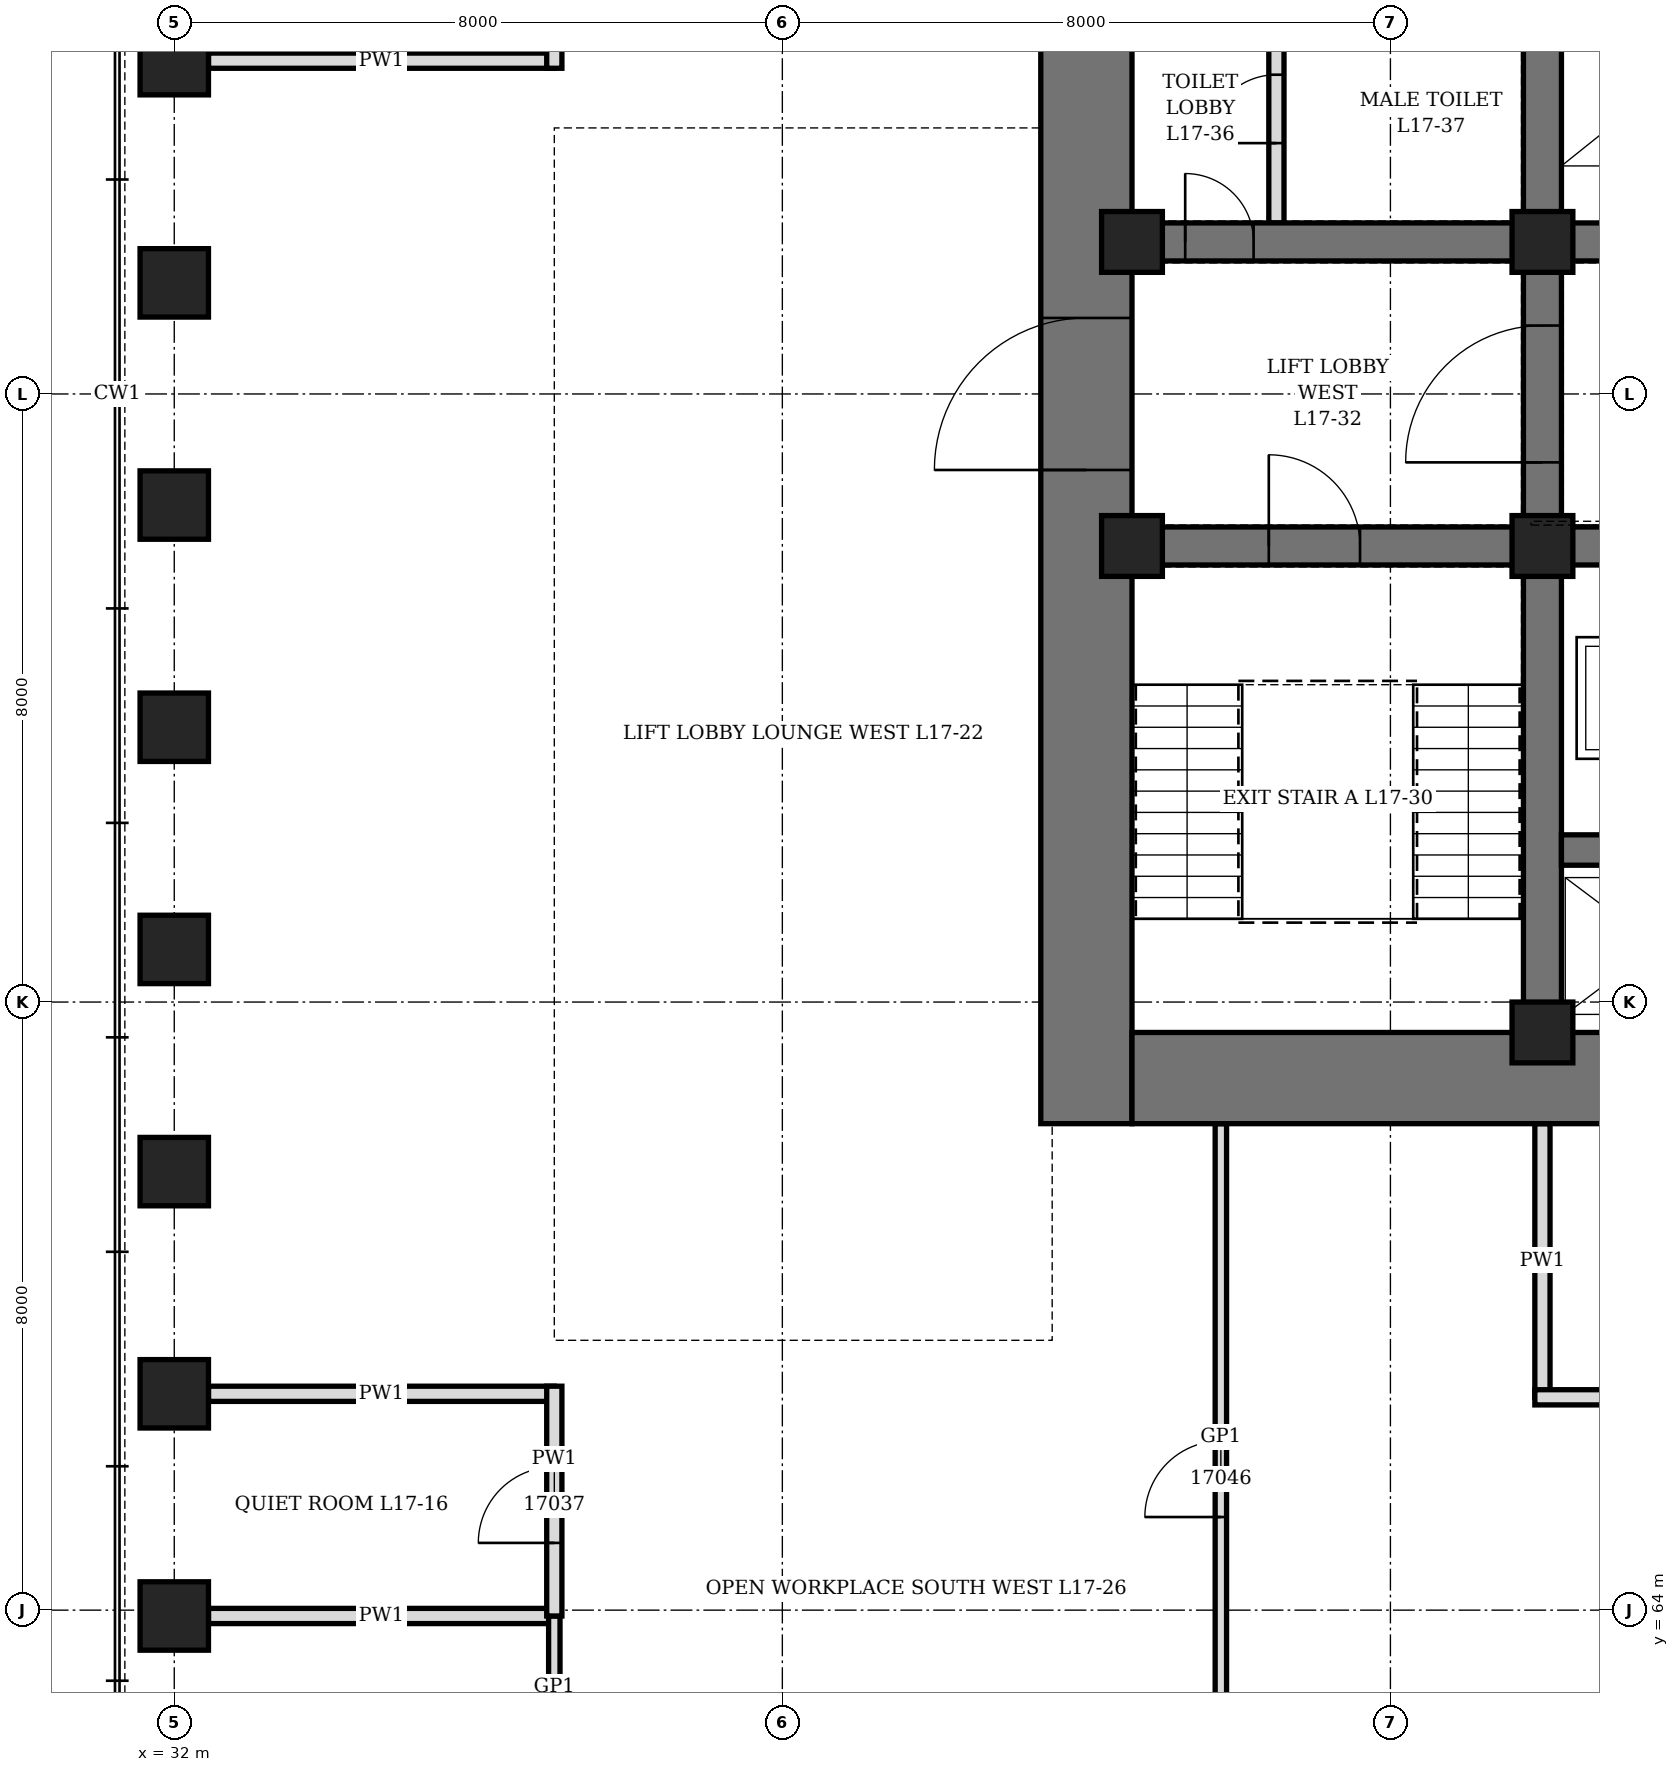
"""IFC4 building model, lengths in metres.
Left out: names, types, materials, properties, quantities, classifications, styles, units other than length and angle.
Written with IfcOpenShell. Run it as: python <this file> out.ifc"""

import sys

from ifc_helpers import new_model, si_unit, direction, frame, frame_2d, origin, origin_2d, place, context, subcontext, project, spatial, rectangle, hollow_rectangle, extrude, element, fill, save


model = new_model("IFC4")
c1 = context("Model", 3, precision=1e-05, world=origin(), true_north=direction((0.0, 1.0)))
c2 = subcontext(c1, "Body", "Model", "MODEL_VIEW")
j1 = project(units=[si_unit("LENGTHUNIT", "METRE"), si_unit("PLANEANGLEUNIT", "RADIAN")], contexts=[c1])
p1 = place(None, origin())
s1 = spatial("IfcSite", under=j1, at=p1, CompositionType="ELEMENT")
p2 = place(p1, origin())
s2 = spatial("IfcBuilding", under=s1, at=p2, CompositionType="ELEMENT")
p3 = place(p2, frame((0.0, 0.0, 81.1)))
s3 = spatial("IfcBuildingStorey", under=s2, at=p3, CompositionType="ELEMENT", Elevation=81.1)
for number, where, z_axis, x_axis in (
    (1, (32.0, 84.385, 0.0), (0.0, 0.0, 1.0), (0.0, 1.0, 0.0)),
    (2, (32.0, 81.461, 0.0), (0.0, 0.0, 1.0), (0.0, 1.0, 0.0)),
    (3, (32.0, 78.539, 0.0), (0.0, 0.0, 1.0), (0.0, 1.0, 0.0)),
    (4, (32.0, 75.615, 0.0), (0.0, 0.0, 1.0), (0.0, 1.0, 0.0)),
    (5, (32.0, 72.692, 0.0), (0.0, 0.0, 1.0), (0.0, 1.0, 0.0)),
    (6, (32.0, 69.769, 0.0), (0.0, 0.0, 1.0), (0.0, 1.0, 0.0)),
    (7, (32.0, 66.846, 0.0), (0.0, 0.0, 1.0), (0.0, 1.0, 0.0)),
    (8, (32.0, 63.923, 0.0), (0.0, 0.0, 1.0), (0.0, 1.0, 0.0)),
):
    element("IfcColumn", number, at=place(p3, frame(where, z_axis=z_axis, x_axis=x_axis)), inside=s3, PredefinedType="COLUMN", context=c2, shape_type="SweptSolid", body=[
        extrude(hollow_rectangle(XDim=0.9, YDim=0.9, WallThickness=0.12, at=origin_2d()), origin(), (0.0, 0.0, 1.0), 4.2),
    ])
p4 = place(p3, frame((44.0, 70.4, 0.0), z_axis=(0.0, 0.0, 1.0), x_axis=(0.0, 1.0, 0.0)))
e9 = element("IfcWall", 9, at=p4, inside=s3, PredefinedType="SHEAR", context=c2, shape_type="SweptSolid", body=[
    extrude(rectangle(XDim=19.2, YDim=1.2, at=frame_2d((9.6, 0.0))), origin(), (0.0, 0.0, 1.0), 4.2),
])
p5 = place(p4, frame((8.6, 0.0, 0.0)))
e10 = element("IfcOpeningElement", 10, at=p5, cuts=e9, PredefinedType="OPENING", context=c2, shape_type="SweptSolid", body=[
    extrude(rectangle(XDim=2.0, YDim=2.4, at=frame_2d((1.0, 1.2))), frame((0.0, 0.61, 0.0), z_axis=(0.0, -1.0, 0.0), x_axis=(1.0, 0.0, 0.0)), (0.0, 0.0, 1.0), 1.22),
])
p6 = place(p3, frame((44.6, 71.0, 0.0), z_axis=(0.0, 0.0, 1.0), x_axis=(1.0, 0.0, 0.0)))
e11 = element("IfcWall", 11, at=p6, inside=s3, PredefinedType="SHEAR", context=c2, shape_type="SweptSolid", body=[
    extrude(rectangle(XDim=22.8, YDim=1.2, at=frame_2d((11.4, 0.0))), origin(), (0.0, 0.0, 1.0), 4.2),
])
p7 = place(p3, frame((50.0, 71.6, 0.0), z_axis=(0.0, 0.0, 1.0), x_axis=(0.0, 1.0, 0.0)))
e12 = element("IfcWall", 12, at=p7, inside=s3, PredefinedType="SHEAR", context=c2, shape_type="SweptSolid", body=[
    extrude(rectangle(XDim=16.8, YDim=0.5, at=frame_2d((8.4, 0.0))), origin(), (0.0, 0.0, 1.0), 4.2),
])
p8 = place(p7, frame((7.5, 0.0, 0.0)))
e13 = element("IfcOpeningElement", 13, at=p8, cuts=e12, PredefinedType="OPENING", context=c2, shape_type="SweptSolid", body=[
    extrude(rectangle(XDim=1.8, YDim=2.4, at=frame_2d((0.9, 1.2))), frame((0.0, 0.26, 0.0), z_axis=(0.0, -1.0, 0.0), x_axis=(1.0, 0.0, 0.0)), (0.0, 0.0, 1.0), 0.52),
])
p9 = place(p3, frame((44.6, 78.0, 0.0), z_axis=(0.0, 0.0, 1.0), x_axis=(1.0, 0.0, 0.0)))
e14 = element("IfcWall", 14, at=p9, inside=s3, PredefinedType="SHEAR", context=c2, shape_type="SweptSolid", body=[
    extrude(rectangle(XDim=5.15, YDim=0.5, at=frame_2d((2.575, 0.0))), origin(), (0.0, 0.0, 1.0), 4.2),
])
p10 = place(p9, frame((1.8, 0.0, 0.0)))
e15 = element("IfcOpeningElement", 15, at=p10, cuts=e14, PredefinedType="OPENING", context=c2, shape_type="SweptSolid", body=[
    extrude(rectangle(XDim=1.2, YDim=2.1, at=frame_2d((0.6, 1.05))), frame((0.0, 0.26, 0.0), z_axis=(0.0, -1.0, 0.0), x_axis=(1.0, 0.0, 0.0)), (0.0, 0.0, 1.0), 0.52),
])
p11 = place(p3, frame((44.6, 82.0, 0.0), z_axis=(0.0, 0.0, 1.0), x_axis=(1.0, 0.0, 0.0)))
e16 = element("IfcWall", 16, at=p11, inside=s3, PredefinedType="SHEAR", context=c2, shape_type="SweptSolid", body=[
    extrude(rectangle(XDim=5.15, YDim=0.5, at=frame_2d((2.575, 0.0))), origin(), (0.0, 0.0, 1.0), 4.2),
])
p12 = place(p11, frame((0.7, 0.0, 0.0)))
e17 = element("IfcOpeningElement", 17, at=p12, cuts=e16, PredefinedType="OPENING", context=c2, shape_type="SweptSolid", body=[
    extrude(rectangle(XDim=0.9, YDim=2.1, at=frame_2d((0.45, 1.05))), frame((0.0, 0.26, 0.0), z_axis=(0.0, -1.0, 0.0), x_axis=(1.0, 0.0, 0.0)), (0.0, 0.0, 1.0), 0.52),
])
p13 = place(p3, frame((50.25, 78.0, 0.0), z_axis=(0.0, 0.0, 1.0), x_axis=(1.0, 0.0, 0.0)))
e18 = element("IfcWall", 18, at=p13, inside=s3, PredefinedType="SHEAR", context=c2, shape_type="SweptSolid", body=[
    extrude(rectangle(XDim=11.5, YDim=0.5, at=frame_2d((5.75, 0.0))), origin(), (0.0, 0.0, 1.0), 4.2),
])
p14 = place(p13, frame((0.7, 0.0, 0.0)))
e19 = element("IfcOpeningElement", 19, at=p14, cuts=e18, PredefinedType="OPENING", context=c2, shape_type="SweptSolid", body=[
    extrude(rectangle(XDim=1.1, YDim=2.2, at=frame_2d((0.55, 1.1))), frame((0.0, 0.26, 0.0), z_axis=(0.0, -1.0, 0.0), x_axis=(1.0, 0.0, 0.0)), (0.0, 0.0, 1.0), 0.52),
])
p15 = place(p13, frame((3.7, 0.0, 0.0)))
e20 = element("IfcOpeningElement", 20, at=p15, cuts=e18, PredefinedType="OPENING", context=c2, shape_type="SweptSolid", body=[
    extrude(rectangle(XDim=1.1, YDim=2.2, at=frame_2d((0.55, 1.1))), frame((0.0, 0.26, 0.0), z_axis=(0.0, -1.0, 0.0), x_axis=(1.0, 0.0, 0.0)), (0.0, 0.0, 1.0), 0.52),
])
p16 = place(p13, frame((6.7, 0.0, 0.0)))
e21 = element("IfcOpeningElement", 21, at=p16, cuts=e18, PredefinedType="OPENING", context=c2, shape_type="SweptSolid", body=[
    extrude(rectangle(XDim=1.1, YDim=2.2, at=frame_2d((0.55, 1.1))), frame((0.0, 0.26, 0.0), z_axis=(0.0, -1.0, 0.0), x_axis=(1.0, 0.0, 0.0)), (0.0, 0.0, 1.0), 0.52),
])
p17 = place(p13, frame((9.7, 0.0, 0.0)))
e22 = element("IfcOpeningElement", 22, at=p17, cuts=e18, PredefinedType="OPENING", context=c2, shape_type="SweptSolid", body=[
    extrude(rectangle(XDim=1.1, YDim=2.2, at=frame_2d((0.55, 1.1))), frame((0.0, 0.26, 0.0), z_axis=(0.0, -1.0, 0.0), x_axis=(1.0, 0.0, 0.0)), (0.0, 0.0, 1.0), 0.52),
])
p18 = place(p3, frame((50.25, 82.0, 0.0), z_axis=(0.0, 0.0, 1.0), x_axis=(1.0, 0.0, 0.0)))
e23 = element("IfcWall", 23, at=p18, inside=s3, PredefinedType="SHEAR", context=c2, shape_type="SweptSolid", body=[
    extrude(rectangle(XDim=11.5, YDim=0.5, at=frame_2d((5.75, 0.0))), origin(), (0.0, 0.0, 1.0), 4.2),
])
p19 = place(p3, frame((50.25, 74.0, 0.0), z_axis=(0.0, 0.0, 1.0), x_axis=(1.0, 0.0, 0.0)))
e24 = element("IfcWall", 24, at=p19, inside=s3, PredefinedType="SHEAR", context=c2, shape_type="SweptSolid", body=[
    extrude(rectangle(XDim=11.5, YDim=0.4, at=frame_2d((5.75, 0.0))), origin(), (0.0, 0.0, 1.0), 4.2),
])
for number, where, z_axis, x_axis in (
    (25, (44.6, 78.0, 0.0), (0.0, 0.0, 1.0), (1.0, 0.0, 0.0)),
    (26, (44.6, 82.0, 0.0), (0.0, 0.0, 1.0), (1.0, 0.0, 0.0)),
    (27, (50.0, 71.6, 0.0), (0.0, 0.0, 1.0), (1.0, 0.0, 0.0)),
    (28, (50.0, 78.0, 0.0), (0.0, 0.0, 1.0), (1.0, 0.0, 0.0)),
    (29, (50.0, 82.0, 0.0), (0.0, 0.0, 1.0), (1.0, 0.0, 0.0)),
):
    element("IfcColumn", number, at=place(p3, frame(where, z_axis=z_axis, x_axis=x_axis)), inside=s3, PredefinedType="COLUMN", context=c2, shape_type="SweptSolid", body=[
        extrude(hollow_rectangle(XDim=0.8, YDim=0.8, WallThickness=0.1, at=origin_2d()), origin(), (0.0, 0.0, 1.0), 4.2),
    ])
p20 = place(p3, frame((46.5, 82.25, 0.0), z_axis=(0.0, 0.0, 1.0), x_axis=(0.0, 1.0, 0.0)))
e30 = element("IfcWall", 30, at=p20, inside=s3, PredefinedType="PARTITIONING", context=c2, shape_type="SweptSolid", body=[
    extrude(rectangle(XDim=3.0, YDim=0.2, at=frame_2d((1.5, 0.0))), origin(), (0.0, 0.0, 1.0), 4.04),
])
p21 = place(p20, frame((1.05, 0.0, 0.0)))
e31 = element("IfcOpeningElement", 31, at=p21, cuts=e30, PredefinedType="OPENING", context=c2, shape_type="SweptSolid", body=[
    extrude(rectangle(XDim=0.9, YDim=2.1, at=frame_2d((0.45, 1.05))), frame((0.0, 0.11, 0.0), z_axis=(0.0, -1.0, 0.0), x_axis=(1.0, 0.0, 0.0)), (0.0, 0.0, 1.0), 0.22),
])
for number, where, z_axis, x_axis in (
    (32, (32.45, 63.923, 0.0), (0.0, 0.0, 1.0), (1.0, 0.0, 0.0)),
    (33, (32.45, 66.846, 0.0), (0.0, 0.0, 1.0), (1.0, 0.0, 0.0)),
    (34, (32.45, 84.385, 0.0), (0.0, 0.0, 1.0), (1.0, 0.0, 0.0)),
):
    element("IfcWall", number, at=place(p3, frame(where, z_axis=z_axis, x_axis=x_axis)), inside=s3, PredefinedType="PARTITIONING", context=c2, shape_type="SweptSolid", body=[
        extrude(rectangle(XDim=4.55, YDim=0.2, at=frame_2d((2.275, 0.0))), origin(), (0.0, 0.0, 1.0), 3.428),
    ])
p22 = place(p3, frame((50.0, 66.8, 0.0), z_axis=(0.0, 0.0, 1.0), x_axis=(0.0, 1.0, 0.0)))
e35 = element("IfcWall", 35, at=p22, inside=s3, PredefinedType="PARTITIONING", context=c2, shape_type="SweptSolid", body=[
    extrude(rectangle(XDim=3.6, YDim=0.2, at=frame_2d((1.8, 0.0))), origin(), (0.0, 0.0, 1.0), 4.04),
])
p23 = place(p3, frame((49.9, 66.8, 0.0), z_axis=(0.0, 0.0, 1.0), x_axis=(1.0, 0.0, 0.0)))
e36 = element("IfcWall", 36, at=p23, inside=s3, PredefinedType="PARTITIONING", context=c2, shape_type="SweptSolid", body=[
    extrude(rectangle(XDim=12.2, YDim=0.2, at=frame_2d((6.1, 0.0))), origin(), (0.0, 0.0, 1.0), 4.04),
])
p24 = place(p23, frame((5.6, 0.0, 0.0)))
e37 = element("IfcOpeningElement", 37, at=p24, cuts=e36, PredefinedType="OPENING", context=c2, shape_type="SweptSolid", body=[
    extrude(rectangle(XDim=1.0, YDim=2.1, at=frame_2d((0.5, 1.05))), frame((0.0, 0.11, 0.0), z_axis=(0.0, -1.0, 0.0), x_axis=(1.0, 0.0, 0.0)), (0.0, 0.0, 1.0), 0.22),
])
p25 = place(p3, frame((37.0, 61.45, 0.0), z_axis=(0.0, 0.0, 1.0), x_axis=(0.0, 1.0, 0.0)))
e38 = element("IfcWall", 38, at=p25, inside=s3, PredefinedType="PARTITIONING", context=c2, shape_type="SweptSolid", body=[
    extrude(rectangle(XDim=2.473, YDim=0.15, at=frame_2d((1.237, 0.0))), origin(), (0.0, 0.0, 1.0), 4.04),
])
p26 = place(p25, frame((0.511, 0.0, 0.0)))
e39 = element("IfcOpeningElement", 39, at=p26, cuts=e38, PredefinedType="OPENING", context=c2, shape_type="SweptSolid", body=[
    extrude(rectangle(XDim=1.0, YDim=2.4, at=frame_2d((0.5, 1.2))), frame((0.0, 0.085, 0.0), z_axis=(0.0, -1.0, 0.0), x_axis=(1.0, 0.0, 0.0)), (0.0, 0.0, 1.0), 0.17),
])
p27 = place(p3, frame((37.0, 63.923, 0.0), z_axis=(0.0, 0.0, 1.0), x_axis=(0.0, 1.0, 0.0)))
e40 = element("IfcWall", 40, at=p27, inside=s3, PredefinedType="PARTITIONING", context=c2, shape_type="SweptSolid", body=[
    extrude(rectangle(XDim=3.023, YDim=0.2, at=frame_2d((1.511, 0.0))), origin(), (0.0, 0.0, 1.0), 4.04),
])
p28 = place(p27, frame((0.961, 0.0, 0.0)))
e41 = element("IfcOpeningElement", 41, at=p28, cuts=e40, PredefinedType="OPENING", context=c2, shape_type="SweptSolid", body=[
    extrude(rectangle(XDim=1.0, YDim=2.1, at=frame_2d((0.5, 1.05))), frame((0.0, 0.11, 0.0), z_axis=(0.0, -1.0, 0.0), x_axis=(1.0, 0.0, 0.0)), (0.0, 0.0, 1.0), 0.22),
])
p29 = place(p3, frame((37.0, 84.285, 0.0), z_axis=(0.0, 0.0, 1.0), x_axis=(0.0, 1.0, 0.0)))
e42 = element("IfcWall", 42, at=p29, inside=s3, PredefinedType="PARTITIONING", context=c2, shape_type="SweptSolid", body=[
    extrude(rectangle(XDim=11.792, YDim=0.2, at=frame_2d((5.896, 0.0))), origin(), (0.0, 0.0, 1.0), 4.04),
])
p30 = place(p29, frame((1.062, 0.0, 0.0)))
e43 = element("IfcOpeningElement", 43, at=p30, cuts=e42, PredefinedType="OPENING", context=c2, shape_type="SweptSolid", body=[
    extrude(rectangle(XDim=1.0, YDim=2.1, at=frame_2d((0.5, 1.05))), frame((0.0, 0.11, 0.0), z_axis=(0.0, -1.0, 0.0), x_axis=(1.0, 0.0, 0.0)), (0.0, 0.0, 1.0), 0.22),
])
p31 = place(p29, frame((6.908, 0.0, 0.0)))
e44 = element("IfcOpeningElement", 44, at=p31, cuts=e42, PredefinedType="OPENING", context=c2, shape_type="SweptSolid", body=[
    extrude(rectangle(XDim=1.0, YDim=2.1, at=frame_2d((0.5, 1.05))), frame((0.0, 0.11, 0.0), z_axis=(0.0, -1.0, 0.0), x_axis=(1.0, 0.0, 0.0)), (0.0, 0.0, 1.0), 0.22),
])
p32 = place(p3, frame((45.769, 61.05, 0.0), z_axis=(0.0, 0.0, 1.0), x_axis=(0.0, 1.0, 0.0)))
e45 = element("IfcWall", 45, at=p32, inside=s3, PredefinedType="PARTITIONING", context=c2, shape_type="SweptSolid", body=[
    extrude(rectangle(XDim=9.35, YDim=0.15, at=frame_2d((4.675, 0.0))), origin(), (0.0, 0.0, 1.0), 3.278),
])
p33 = place(p32, frame((4.175, 0.0, 0.0)))
e46 = element("IfcOpeningElement", 46, at=p33, cuts=e45, PredefinedType="OPENING", context=c2, shape_type="SweptSolid", body=[
    extrude(rectangle(XDim=1.0, YDim=2.4, at=frame_2d((0.5, 1.2))), frame((0.0, 0.085, 0.0), z_axis=(0.0, -1.0, 0.0), x_axis=(1.0, 0.0, 0.0)), (0.0, 0.0, 1.0), 0.17),
])
p34 = place(p12, origin())
e47 = element("IfcDoor", 47, at=p34, inside=s3, OperationType="SINGLE_SWING_LEFT", PredefinedType="DOOR", context=c2, shape_type="SweptSolid", body=[
    extrude(rectangle(XDim=0.9, YDim=2.1, at=frame_2d((0.45, 1.05))), frame((0.0, 0.25, 0.0), z_axis=(0.0, -1.0, 0.0), x_axis=(1.0, 0.0, 0.0)), (0.0, 0.0, 1.0), 0.5),
])
fill(e17, e47)
p35 = place(p21, origin())
e48 = element("IfcDoor", 48, at=p35, inside=s3, OperationType="SINGLE_SWING_RIGHT", PredefinedType="DOOR", context=c2, shape_type="SweptSolid", body=[
    extrude(rectangle(XDim=0.9, YDim=2.1, at=frame_2d((0.45, 1.05))), frame((0.0, 0.1, 0.0), z_axis=(0.0, -1.0, 0.0), x_axis=(1.0, 0.0, 0.0)), (0.0, 0.0, 1.0), 0.199),
])
fill(e31, e48)
p36 = place(p10, origin())
e49 = element("IfcDoor", 49, at=p36, inside=s3, OperationType="SINGLE_SWING_LEFT", PredefinedType="DOOR", context=c2, shape_type="SweptSolid", body=[
    extrude(rectangle(XDim=1.2, YDim=2.1, at=frame_2d((0.6, 1.05))), frame((0.0, 0.25, 0.0), z_axis=(0.0, -1.0, 0.0), x_axis=(1.0, 0.0, 0.0)), (0.0, 0.0, 1.0), 0.5),
])
fill(e15, e49)
p37 = place(p5, origin())
e50 = element("IfcDoor", 50, at=p37, inside=s3, OperationType="DOUBLE_DOOR_SINGLE_SWING", PredefinedType="DOOR", context=c2, shape_type="SweptSolid", body=[
    extrude(rectangle(XDim=2.0, YDim=2.4, at=frame_2d((1.0, 1.2))), frame((0.0, 0.35, 0.0), z_axis=(0.0, -1.0, 0.0), x_axis=(1.0, 0.0, 0.0)), (0.0, 0.0, 1.0), 0.7),
])
fill(e10, e50)
p38 = place(p8, origin())
e51 = element("IfcDoor", 51, at=p38, inside=s3, OperationType="DOUBLE_DOOR_SINGLE_SWING", PredefinedType="DOOR", context=c2, shape_type="SweptSolid", body=[
    extrude(rectangle(XDim=1.8, YDim=2.4, at=frame_2d((0.9, 1.2))), frame((0.0, 0.25, 0.0), z_axis=(0.0, -1.0, 0.0), x_axis=(1.0, 0.0, 0.0)), (0.0, 0.0, 1.0), 0.5),
])
fill(e13, e51)
p39 = place(p26, origin())
e52 = element("IfcDoor", 52, at=p39, inside=s3, OperationType="SINGLE_SWING_RIGHT", PredefinedType="DOOR", context=c2, shape_type="SweptSolid", body=[
    extrude(rectangle(XDim=1.0, YDim=2.4, at=frame_2d((0.5, 1.2))), frame((0.0, 0.075, 0.0), z_axis=(0.0, -1.0, 0.0), x_axis=(1.0, 0.0, 0.0)), (0.0, 0.0, 1.0), 0.149),
])
fill(e39, e52)
p40 = place(p28, origin())
e53 = element("IfcDoor", 53, at=p40, inside=s3, OperationType="SINGLE_SWING_LEFT", PredefinedType="DOOR", context=c2, shape_type="SweptSolid", body=[
    extrude(rectangle(XDim=1.0, YDim=2.1, at=frame_2d((0.5, 1.05))), frame((0.0, 0.1, 0.0), z_axis=(0.0, -1.0, 0.0), x_axis=(1.0, 0.0, 0.0)), (0.0, 0.0, 1.0), 0.199),
])
fill(e41, e53)
p41 = place(p33, origin())
e54 = element("IfcDoor", 54, at=p41, inside=s3, OperationType="SINGLE_SWING_RIGHT", PredefinedType="DOOR", context=c2, shape_type="SweptSolid", body=[
    extrude(rectangle(XDim=1.0, YDim=2.4, at=frame_2d((0.5, 1.2))), frame((0.0, 0.075, 0.0), z_axis=(0.0, -1.0, 0.0), x_axis=(1.0, 0.0, 0.0)), (0.0, 0.0, 1.0), 0.149),
])
fill(e46, e54)
save(model, sys.argv[1])
